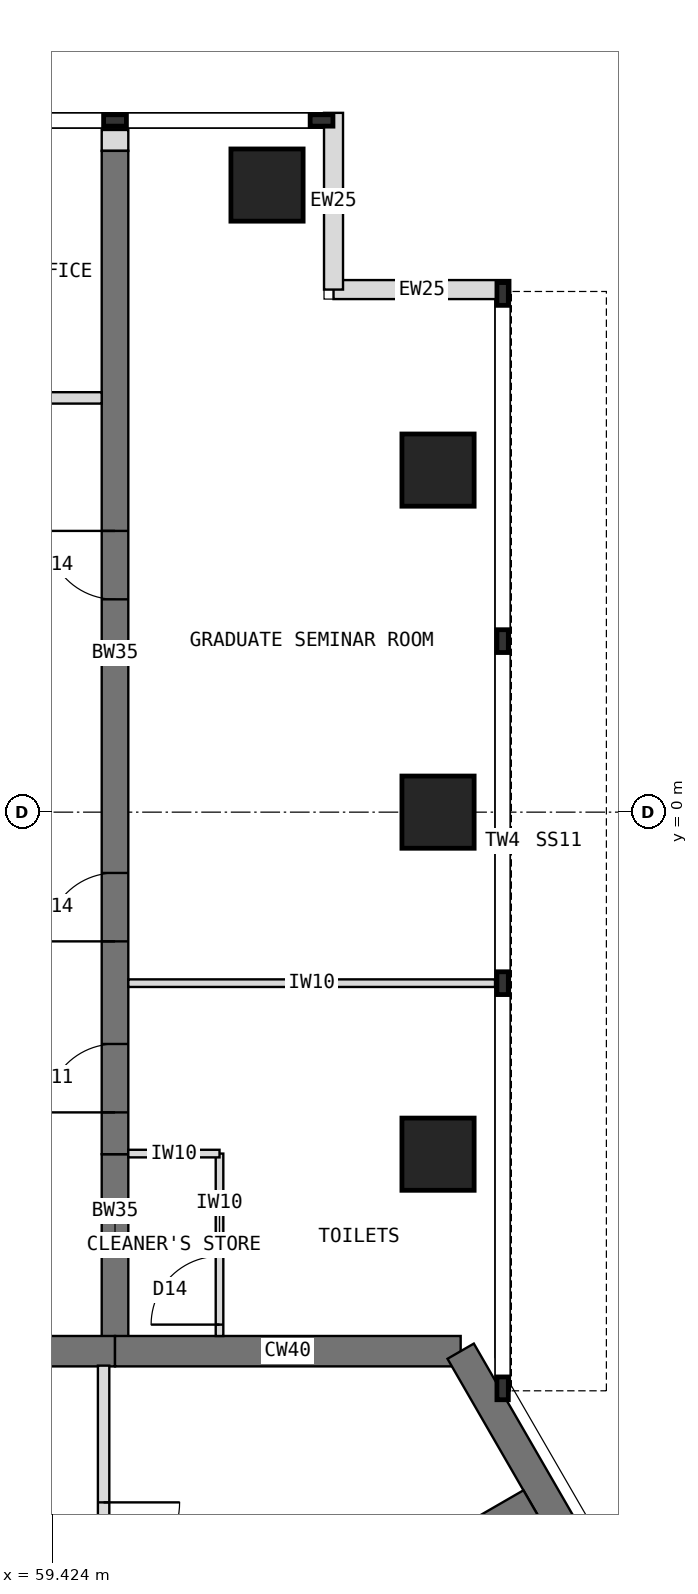
"""IFC4 building model, lengths in metres.
Left out: names, types, materials, properties, quantities, classifications, styles, units other than length and angle.
Written with IfcOpenShell. Run it as: python <this file> out.ifc"""

import sys

from ifc_helpers import new_model, si_unit, direction, frame, frame_2d, origin, origin_2d, place, context, subcontext, project, spatial, rectangle, extrude, element, fill, save


model = new_model("IFC4")
c1 = context("Model", 3, precision=1e-05, world=origin(), true_north=direction((0.0, 1.0)))
c2 = subcontext(c1, "Body", "Model", "MODEL_VIEW")
j1 = project(units=[si_unit("LENGTHUNIT", "METRE"), si_unit("PLANEANGLEUNIT", "RADIAN")], contexts=[c1])
p1 = place(None, origin())
s1 = spatial("IfcSite", under=j1, at=p1, CompositionType="ELEMENT")
p2 = place(p1, origin())
s2 = spatial("IfcBuilding", under=s1, at=p2, CompositionType="ELEMENT")
p3 = place(p2, frame((0.0, 0.0, 267.5)))
s3 = spatial("IfcBuildingStorey", under=s2, at=p3, CompositionType="ELEMENT", Elevation=267.5)
p4 = place(p3, frame((64.798, -7.092, 0.0), z_axis=(0.0, 0.0, 1.0), x_axis=(-1.0, 0.0, 0.0)))
e1 = element("IfcWall", 1, at=p4, inside=s3, PredefinedType="SHEAR", context=c2, shape_type="SweptSolid", body=[
    extrude(rectangle(XDim=4.548, YDim=0.4, at=frame_2d((2.274, 0.0))), origin(), (0.0, 0.0, 1.0), 4.0),
])
p5 = place(p3, frame((60.25, -7.092, 0.0), z_axis=(0.0, 0.0, 1.0), x_axis=(-1.0, 0.0, 0.0)))
e2 = element("IfcWall", 2, at=p5, inside=s3, PredefinedType="SHEAR", context=c2, shape_type="SweptSolid", body=[
    extrude(rectangle(XDim=3.5, YDim=0.4, at=frame_2d((1.75, 0.0))), origin(), (0.0, 0.0, 1.0), 4.0),
])
p6 = place(p5, frame((0.85, 0.0, 0.0)))
e3 = element("IfcOpeningElement", 3, at=p6, cuts=e2, PredefinedType="OPENING", context=c2, shape_type="SweptSolid", body=[
    extrude(rectangle(XDim=1.8, YDim=2.1, at=frame_2d((0.9, 1.05))), frame((0.0, 0.21, 0.0), z_axis=(0.0, -1.0, 0.0), x_axis=(1.0, 0.0, 0.0)), (0.0, 0.0, 1.0), 0.42),
])
p7 = place(p3, frame((71.096, -18.0, 0.0), z_axis=(0.0, 0.0, 1.0), x_axis=(-0.500005998175, 0.866021940709, 0.0)))
e4 = element("IfcWall", 4, at=p7, inside=s3, PredefinedType="SHEAR", context=c2, shape_type="SweptSolid", body=[
    extrude(rectangle(XDim=12.596, YDim=0.4, at=frame_2d((6.298, 0.0))), origin(), (0.0, 0.0, 1.0), 4.0),
])
p8 = place(p3, frame((60.25, -7.092, 0.0), z_axis=(0.0, 0.0, 1.0), x_axis=(0.0, 1.0, 0.0)))
e5 = element("IfcWall", 5, at=p8, inside=s3, PredefinedType="SHEAR", context=c2, shape_type="SweptSolid", body=[
    extrude(rectangle(XDim=2.592, YDim=0.35, at=frame_2d((1.296, 0.0))), origin(), (0.0, 0.0, 1.0), 4.0),
])
p9 = place(p3, frame((60.25, -4.5, 0.0), z_axis=(0.0, 0.0, 1.0), x_axis=(0.0, 1.0, 0.0)))
e6 = element("IfcWall", 6, at=p9, inside=s3, PredefinedType="SHEAR", context=c2, shape_type="SweptSolid", body=[
    extrude(rectangle(XDim=13.2, YDim=0.35, at=frame_2d((6.6, 0.0))), origin(), (0.0, 0.0, 1.0), 4.0),
])
p10 = place(p9, frame((0.55, 0.0, 0.0)))
e7 = element("IfcOpeningElement", 7, at=p10, cuts=e6, PredefinedType="OPENING", context=c2, shape_type="SweptSolid", body=[
    extrude(rectangle(XDim=0.9, YDim=2.1, at=frame_2d((0.45, 1.05))), frame((0.0, 0.185, 0.0), z_axis=(0.0, -1.0, 0.0), x_axis=(1.0, 0.0, 0.0)), (0.0, 0.0, 1.0), 0.37),
])
p11 = place(p9, frame((2.8, 0.0, 0.0)))
e8 = element("IfcOpeningElement", 8, at=p11, cuts=e6, PredefinedType="OPENING", context=c2, shape_type="SweptSolid", body=[
    extrude(rectangle(XDim=0.9, YDim=2.1, at=frame_2d((0.45, 1.05))), frame((0.0, 0.185, 0.0), z_axis=(0.0, -1.0, 0.0), x_axis=(1.0, 0.0, 0.0)), (0.0, 0.0, 1.0), 0.37),
])
p12 = place(p9, frame((7.3, 0.0, 0.0)))
e9 = element("IfcOpeningElement", 9, at=p12, cuts=e6, PredefinedType="OPENING", context=c2, shape_type="SweptSolid", body=[
    extrude(rectangle(XDim=0.9, YDim=2.1, at=frame_2d((0.45, 1.05))), frame((0.0, 0.185, 0.0), z_axis=(0.0, -1.0, 0.0), x_axis=(1.0, 0.0, 0.0)), (0.0, 0.0, 1.0), 0.37),
])
for number, where, z_axis, x_axis in (
    (10, (64.5, -4.5, 0.0), (0.0, 0.0, 1.0), (1.0, 0.0, 0.0)),
    (11, (64.5, 0.0, 0.0), (0.0, 0.0, 1.0), (1.0, 0.0, 0.0)),
    (12, (64.5, 4.5, 0.0), (0.0, 0.0, 1.0), (1.0, 0.0, 0.0)),
    (13, (62.25, 8.25, 0.0), (0.0, 0.0, 1.0), (1.0, 0.0, 0.0)),
):
    element("IfcColumn", number, at=place(p3, frame(where, z_axis=z_axis, x_axis=x_axis)), inside=s3, PredefinedType="COLUMN", context=c2, shape_type="SweptSolid", body=[
        extrude(rectangle(XDim=0.95, YDim=0.95, at=origin_2d()), origin(), (0.0, 0.0, 1.0), 4.0),
    ])
for number, where, z_axis, x_axis in (
    (14, (65.45, 6.875, 0.0), (0.0, 0.0, 1.0), (-1.0, 0.0, 0.0)),
    (15, (63.125, 6.875, 0.0), (0.0, 0.0, 1.0), (0.0, 1.0, 0.0)),
):
    element("IfcWall", number, at=place(p3, frame(where, z_axis=z_axis, x_axis=x_axis)), inside=s3, PredefinedType="STANDARD", context=c2, shape_type="SweptSolid", body=[
        extrude(rectangle(XDim=2.325, YDim=0.25, at=frame_2d((1.163, 0.0))), origin(), (0.0, 0.0, 1.0), 3.8),
    ])
p13 = place(p3, frame((60.25, 8.7, 0.0), z_axis=(0.0, 0.0, 1.0), x_axis=(0.0, 1.0, 0.0)))
e16 = element("IfcWall", 16, at=p13, inside=s3, PredefinedType="PARTITIONING", context=c2, shape_type="SweptSolid", body=[
    extrude(rectangle(XDim=0.275, YDim=0.35, at=frame_2d((0.138, 0.0))), origin(), (0.0, 0.0, 1.0), 3.8),
])
p14 = place(p3, frame((60.52, -12.099, 0.0), z_axis=(0.0, 0.0, 1.0), x_axis=(0.866026570101, 0.499997979876, 0.0)))
e17 = element("IfcWall", 17, at=p14, inside=s3, PredefinedType="SHEAR", context=c2, shape_type="SweptSolid", body=[
    extrude(rectangle(XDim=6.008, YDim=0.4, at=frame_2d((3.004, 0.0))), origin(), (0.0, 0.0, 1.0), 4.0),
])
p15 = place(p3, frame((60.425, -2.25, 0.0), z_axis=(0.0, 0.0, 1.0), x_axis=(1.0, 0.0, 0.0)))
e18 = element("IfcWall", 18, at=p15, inside=s3, PredefinedType="PARTITIONING", context=c2, shape_type="SweptSolid", body=[
    extrude(rectangle(XDim=4.825, YDim=0.1, at=frame_2d((2.413, 0.0))), origin(), (0.0, 0.0, 1.0), 3.8),
])
p16 = place(p3, frame((61.625, -6.892, 0.0), z_axis=(0.0, 0.0, 1.0), x_axis=(0.0, 1.0, 0.0)))
e19 = element("IfcWall", 19, at=p16, inside=s3, PredefinedType="PARTITIONING", context=c2, shape_type="SweptSolid", body=[
    extrude(rectangle(XDim=2.4, YDim=0.1, at=frame_2d((1.2, 0.0))), origin(), (0.0, 0.0, 1.0), 3.8),
])
p17 = place(p16, frame((0.15, 0.0, 0.0)))
e20 = element("IfcOpeningElement", 20, at=p17, cuts=e19, PredefinedType="OPENING", context=c2, shape_type="SweptSolid", body=[
    extrude(rectangle(XDim=0.9, YDim=2.1, at=frame_2d((0.45, 1.05))), frame((0.0, 0.06, 0.0), z_axis=(0.0, -1.0, 0.0), x_axis=(1.0, 0.0, 0.0)), (0.0, 0.0, 1.0), 0.12),
])
p18 = place(p3, frame((60.425, -4.492, 0.0), z_axis=(0.0, 0.0, 1.0), x_axis=(1.0, 0.0, 0.0)))
e21 = element("IfcWall", 21, at=p18, inside=s3, PredefinedType="PARTITIONING", context=c2, shape_type="SweptSolid", body=[
    extrude(rectangle(XDim=1.2, YDim=0.1, at=frame_2d((0.6, 0.0))), origin(), (0.0, 0.0, 1.0), 3.267),
])
p19 = place(p3, frame((60.1, -7.282, 0.0), z_axis=(0.0, 0.0, 1.0), x_axis=(0.0, -1.0, 0.0)))
e22 = element("IfcWall", 22, at=p19, inside=s3, PredefinedType="PARTITIONING", context=c2, shape_type="SweptSolid", body=[
    extrude(rectangle(XDim=4.618, YDim=0.15, at=frame_2d((2.309, 0.0))), origin(), (0.0, 0.0, 1.0), 3.8),
])
p20 = place(p19, frame((1.799, 0.0, 0.0)))
e23 = element("IfcOpeningElement", 23, at=p20, cuts=e22, PredefinedType="OPENING", context=c2, shape_type="SweptSolid", body=[
    extrude(rectangle(XDim=1.0, YDim=2.1, at=frame_2d((0.5, 1.05))), frame((0.0, 0.085, 0.0), z_axis=(0.0, -1.0, 0.0), x_axis=(1.0, 0.0, 0.0)), (0.0, 0.0, 1.0), 0.17),
])
p21 = place(p3, frame((60.075, 5.45, 0.0), z_axis=(0.0, 0.0, 1.0), x_axis=(-1.0, 0.0, 0.0)))
e24 = element("IfcWall", 24, at=p21, inside=s3, PredefinedType="PARTITIONING", context=c2, shape_type="SweptSolid", body=[
    extrude(rectangle(XDim=3.15, YDim=0.15, at=frame_2d((1.575, 0.0))), origin(), (0.0, 0.0, 1.0), 3.8),
])
p22 = place(p21, frame((1.075, 0.0, 0.0)))
e25 = element("IfcOpeningElement", 25, at=p22, cuts=e24, PredefinedType="OPENING", context=c2, shape_type="SweptSolid", body=[
    extrude(rectangle(XDim=1.0, YDim=2.1, at=frame_2d((0.5, 1.05))), frame((0.0, 0.085, 0.0), z_axis=(0.0, -1.0, 0.0), x_axis=(1.0, 0.0, 0.0)), (0.0, 0.0, 1.0), 0.17),
])
p23 = place(p17, origin())
e26 = element("IfcDoor", 26, at=p23, inside=s3, OperationType="SINGLE_SWING_LEFT", PredefinedType="DOOR", context=c2, shape_type="SweptSolid", body=[
    extrude(rectangle(XDim=0.9, YDim=2.1, at=frame_2d((0.45, 1.05))), frame((0.0, 0.025, 0.0), z_axis=(0.0, -1.0, 0.0), x_axis=(1.0, 0.0, 0.0)), (0.0, 0.0, 1.0), 0.05),
])
fill(e20, e26)
p24 = place(p20, origin())
e27 = element("IfcDoor", 27, at=p24, inside=s3, OperationType="SINGLE_SWING_LEFT", PredefinedType="DOOR", context=c2, shape_type="SweptSolid", body=[
    extrude(rectangle(XDim=1.0, YDim=2.1, at=frame_2d((0.5, 1.05))), frame((0.0, 0.025, 0.0), z_axis=(0.0, -1.0, 0.0), x_axis=(1.0, 0.0, 0.0)), (0.0, 0.0, 1.0), 0.05),
])
fill(e23, e27)
p25 = place(p10, origin())
e28 = element("IfcDoor", 28, at=p25, inside=s3, OperationType="SINGLE_SWING_LEFT", PredefinedType="DOOR", context=c2, shape_type="SweptSolid", body=[
    extrude(rectangle(XDim=0.9, YDim=2.1, at=frame_2d((0.45, 1.05))), frame((0.0, 0.025, 0.0), z_axis=(0.0, -1.0, 0.0), x_axis=(1.0, 0.0, 0.0)), (0.0, 0.0, 1.0), 0.05),
])
fill(e7, e28)
p26 = place(p11, origin())
e29 = element("IfcDoor", 29, at=p26, inside=s3, OperationType="SINGLE_SWING_LEFT", PredefinedType="DOOR", context=c2, shape_type="SweptSolid", body=[
    extrude(rectangle(XDim=0.9, YDim=2.1, at=frame_2d((0.45, 1.05))), frame((0.0, 0.025, 0.0), z_axis=(0.0, -1.0, 0.0), x_axis=(1.0, 0.0, 0.0)), (0.0, 0.0, 1.0), 0.05),
])
fill(e8, e29)
p27 = place(p12, origin())
e30 = element("IfcDoor", 30, at=p27, inside=s3, OperationType="SINGLE_SWING_RIGHT", PredefinedType="DOOR", context=c2, shape_type="SweptSolid", body=[
    extrude(rectangle(XDim=0.9, YDim=2.1, at=frame_2d((0.45, 1.05))), frame((0.0, 0.025, 0.0), z_axis=(0.0, -1.0, 0.0), x_axis=(1.0, 0.0, 0.0)), (0.0, 0.0, 1.0), 0.05),
])
fill(e9, e30)
save(model, sys.argv[1])
